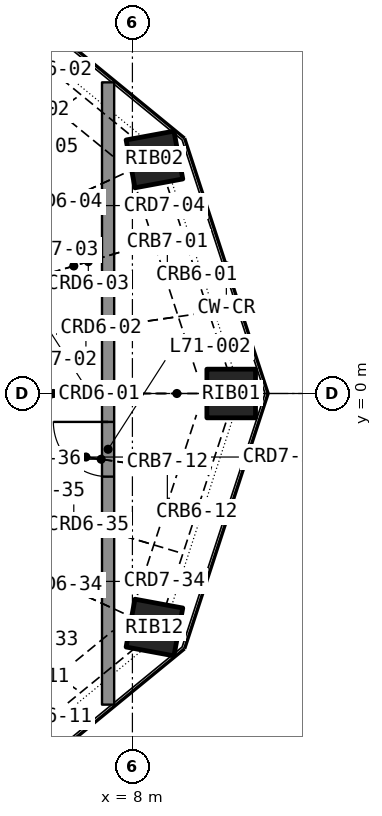
"""IFC4 building model, lengths in metres.
Left out: names, types, materials, properties, quantities, classifications, styles, units other than length and angle.
Written with IfcOpenShell. Run it as: python <this file> out.ifc"""

import sys

from ifc_helpers import new_model, si_unit, direction, frame, frame_2d, origin, origin_2d, place, context, subcontext, project, spatial, rectangle, hollow_rectangle, extrude, element, fill, save


model = new_model("IFC4")
c1 = context("Model", 3, precision=1e-05, world=origin(), true_north=direction((0.0, 1.0)))
c2 = subcontext(c1, "Body", "Model", "MODEL_VIEW")
j1 = project(units=[si_unit("LENGTHUNIT", "METRE"), si_unit("PLANEANGLEUNIT", "RADIAN")], contexts=[c1])
p1 = place(None, origin())
s1 = spatial("IfcSite", under=j1, at=p1, CompositionType="ELEMENT")
p2 = place(p1, origin())
s2 = spatial("IfcBuilding", under=s1, at=p2, CompositionType="ELEMENT")
p3 = place(p2, frame((0.0, 0.0, 292.1)))
s3 = spatial("IfcBuildingStorey", under=s2, at=p3, CompositionType="ELEMENT", Elevation=292.1)
p4 = place(p3, frame((9.625, 0.0, 0.0), z_axis=(-0.136922778, 0.0, 0.990581725), x_axis=(0.0, -1.0, 0.0)))
e1 = element("IfcColumn", 1, at=p4, inside=s3, PredefinedType="COLUMN", context=c2, shape_type="SweptSolid", body=[
    extrude(hollow_rectangle(XDim=0.8, YDim=0.8, WallThickness=0.025, at=origin_2d()), origin(), (0.0, 0.0, 1.0), 3.937),
])
for number, where, z_axis, x_axis in (
    (2, (8.362, 3.849, 0.0), (-0.119, -0.055, 0.991), (0.575, -0.818, 0.024)),
    (3, (8.362, -3.849, 0.0), (-0.119, 0.055, 0.991), (-0.575, -0.818, -0.024)),
):
    element("IfcColumn", number, at=place(p3, frame(where, z_axis=z_axis, x_axis=x_axis)), inside=s3, PredefinedType="COLUMN", context=c2, shape_type="SweptSolid", body=[
        extrude(hollow_rectangle(XDim=0.8, YDim=0.8, WallThickness=0.025, at=origin_2d()), origin(), (0.0, 0.0, 1.0), 3.934),
    ])
p5 = place(p3, frame((7.6, -5.117, 0.0), z_axis=(0.0, 0.0, 1.0), x_axis=(0.0, 1.0, 0.0)))
e4 = element("IfcWall", 4, at=p5, inside=s3, PredefinedType="PARTITIONING", context=c2, shape_type="SweptSolid", body=[
    extrude(rectangle(XDim=10.235, YDim=0.2, at=frame_2d((5.117, 0.0))), origin(), (0.0, 0.0, 1.0), 2.9),
])
p6 = place(p5, frame((3.75, 0.0, 0.0)))
e5 = element("IfcOpeningElement", 5, at=p6, cuts=e4, PredefinedType="OPENING", context=c2, shape_type="SweptSolid", body=[
    extrude(rectangle(XDim=0.9, YDim=2.1, at=frame_2d((0.45, 1.05))), frame((0.0, 0.11, 0.0), z_axis=(0.0, -1.0, 0.0), x_axis=(1.0, 0.0, 0.0)), (0.0, 0.0, 1.0), 0.22),
])
p7 = place(p6, origin())
e6 = element("IfcDoor", 6, at=p7, inside=s3, OperationType="SINGLE_SWING_RIGHT", PredefinedType="DOOR", context=c2, shape_type="SweptSolid", body=[
    extrude(rectangle(XDim=0.9, YDim=2.1, at=frame_2d((0.45, 1.05))), frame((0.0, 0.025, 0.0), z_axis=(0.0, -1.0, 0.0), x_axis=(1.0, 0.0, 0.0)), (0.0, 0.0, 1.0), 0.05),
])
fill(e5, e6)
save(model, sys.argv[1])
